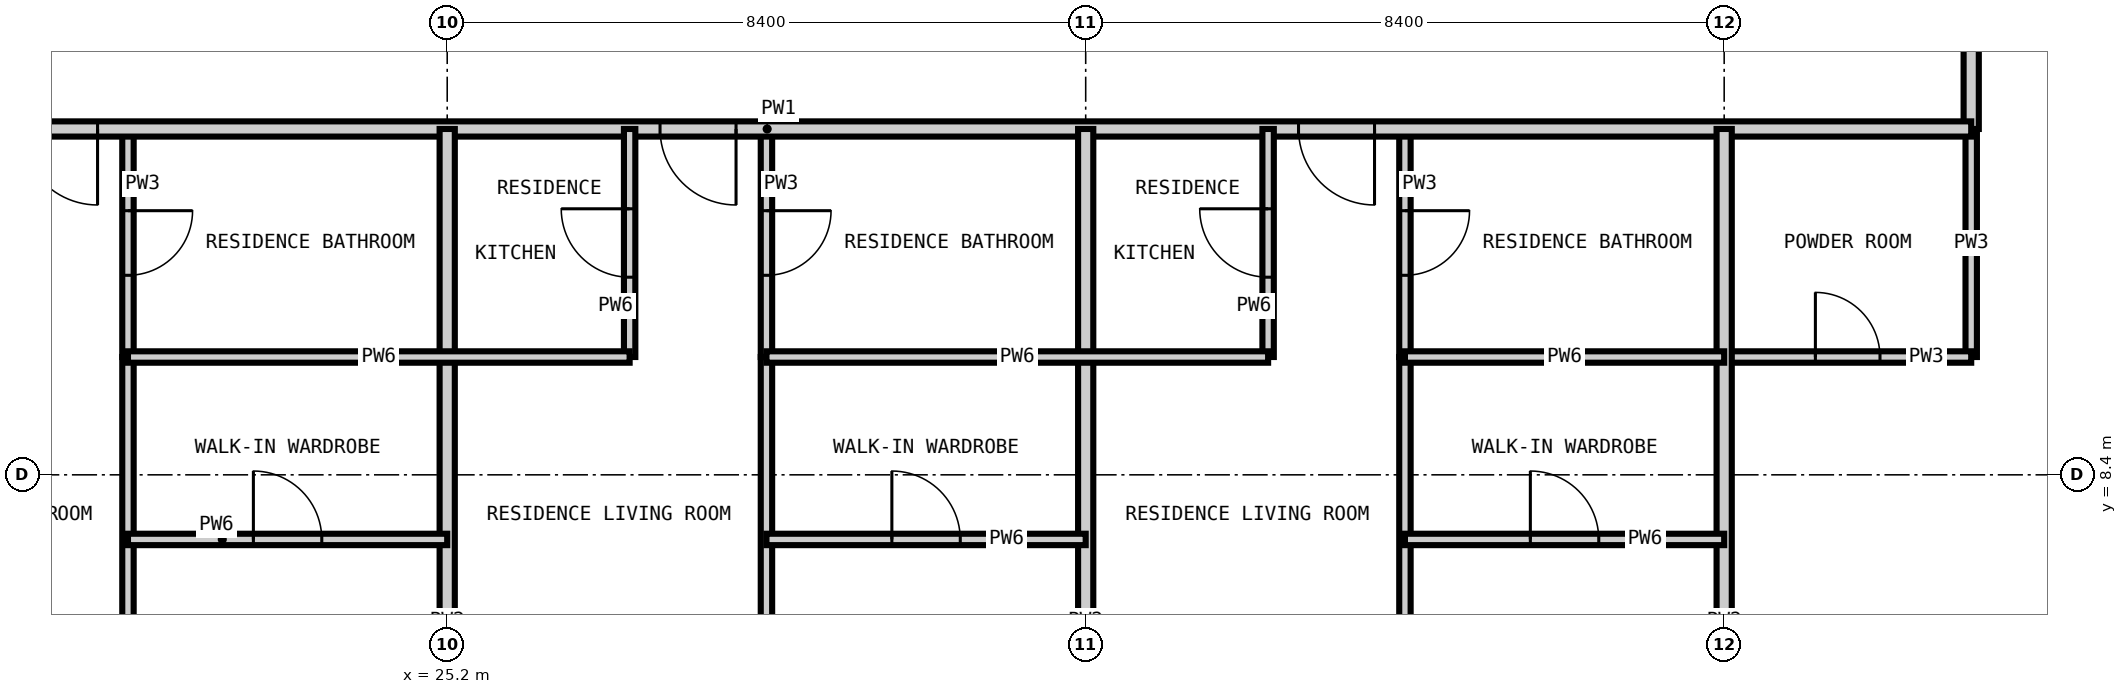
"""IFC4 building model, lengths in metres.
Left out: names, types, materials, properties, quantities, classifications, styles, units other than length and angle.
Written with IfcOpenShell. Run it as: python <this file> out.ifc"""

import sys

from ifc_helpers import new_model, si_unit, direction, frame, frame_2d, origin, place, context, subcontext, project, spatial, rectangle, extrude, element, fill, save


model = new_model("IFC4")
c1 = context("Model", 3, precision=1e-05, world=origin(), true_north=direction((0.0, 1.0)))
c2 = subcontext(c1, "Body", "Model", "MODEL_VIEW")
j1 = project(units=[si_unit("LENGTHUNIT", "METRE"), si_unit("PLANEANGLEUNIT", "RADIAN")], contexts=[c1])
p1 = place(None, origin())
s1 = spatial("IfcSite", under=j1, at=p1, CompositionType="ELEMENT")
p2 = place(p1, origin())
s2 = spatial("IfcBuilding", under=s1, at=p2, CompositionType="ELEMENT")
p3 = place(p2, frame((0.0, 0.0, 45.0)))
s3 = spatial("IfcBuildingStorey", under=s2, at=p3, CompositionType="ELEMENT", Elevation=45.0)
p4 = place(p3, frame((21.0, 9.95, 0.0), z_axis=(0.0, 0.0, 1.0), x_axis=(0.0, 1.0, 0.0)))
e1 = element("IfcWall", 1, at=p4, inside=s3, PredefinedType="PARTITIONING", context=c2, shape_type="SweptSolid", body=[
    extrude(rectangle(XDim=3.0, YDim=0.15, at=frame_2d((1.5, 0.0))), origin(), (0.0, 0.0, 1.0), 3.25),
])
p5 = place(p4, frame((1.075, 0.0, 0.0)))
e2 = element("IfcOpeningElement", 2, at=p5, cuts=e1, PredefinedType="OPENING", context=c2, shape_type="SweptSolid", body=[
    extrude(rectangle(XDim=0.85, YDim=2.1, at=frame_2d((0.425, 1.05))), frame((0.0, 0.085, 0.0), z_axis=(0.0, -1.0, 0.0), x_axis=(1.0, 0.0, 0.0)), (0.0, 0.0, 1.0), 0.17),
])
p6 = place(p3, frame((29.4, 9.95, 0.0), z_axis=(0.0, 0.0, 1.0), x_axis=(0.0, 1.0, 0.0)))
e3 = element("IfcWall", 3, at=p6, inside=s3, PredefinedType="PARTITIONING", context=c2, shape_type="SweptSolid", body=[
    extrude(rectangle(XDim=3.0, YDim=0.15, at=frame_2d((1.5, 0.0))), origin(), (0.0, 0.0, 1.0), 3.25),
])
p7 = place(p6, frame((1.075, 0.0, 0.0)))
e4 = element("IfcOpeningElement", 4, at=p7, cuts=e3, PredefinedType="OPENING", context=c2, shape_type="SweptSolid", body=[
    extrude(rectangle(XDim=0.85, YDim=2.1, at=frame_2d((0.425, 1.05))), frame((0.0, 0.085, 0.0), z_axis=(0.0, -1.0, 0.0), x_axis=(1.0, 0.0, 0.0)), (0.0, 0.0, 1.0), 0.17),
])
p8 = place(p3, frame((37.8, 9.95, 0.0), z_axis=(0.0, 0.0, 1.0), x_axis=(0.0, 1.0, 0.0)))
e5 = element("IfcWall", 5, at=p8, inside=s3, PredefinedType="PARTITIONING", context=c2, shape_type="SweptSolid", body=[
    extrude(rectangle(XDim=3.0, YDim=0.15, at=frame_2d((1.5, 0.0))), origin(), (0.0, 0.0, 1.0), 3.25),
])
p9 = place(p8, frame((1.075, 0.0, 0.0)))
e6 = element("IfcOpeningElement", 6, at=p9, cuts=e5, PredefinedType="OPENING", context=c2, shape_type="SweptSolid", body=[
    extrude(rectangle(XDim=0.85, YDim=2.1, at=frame_2d((0.425, 1.05))), frame((0.0, 0.085, 0.0), z_axis=(0.0, -1.0, 0.0), x_axis=(1.0, 0.0, 0.0)), (0.0, 0.0, 1.0), 0.17),
])
p10 = place(p3, frame((45.25, 9.95, 0.0), z_axis=(0.0, 0.0, 1.0), x_axis=(0.0, 1.0, 0.0)))
e7 = element("IfcWall", 7, at=p10, inside=s3, PredefinedType="PARTITIONING", context=c2, shape_type="SweptSolid", body=[
    extrude(rectangle(XDim=3.0, YDim=0.15, at=frame_2d((1.5, 0.0))), origin(), (0.0, 0.0, 1.0), 3.25),
])
p11 = place(p3, frame((42.0, 9.95, 0.0), z_axis=(0.0, 0.0, 1.0), x_axis=(1.0, 0.0, 0.0)))
e8 = element("IfcWall", 8, at=p11, inside=s3, PredefinedType="PARTITIONING", context=c2, shape_type="SweptSolid", body=[
    extrude(rectangle(XDim=3.25, YDim=0.15, at=frame_2d((1.625, 0.0))), origin(), (0.0, 0.0, 1.0), 3.25),
])
p12 = place(p11, frame((1.2, 0.0, 0.0)))
e9 = element("IfcOpeningElement", 9, at=p12, cuts=e8, PredefinedType="OPENING", context=c2, shape_type="SweptSolid", body=[
    extrude(rectangle(XDim=0.85, YDim=2.1, at=frame_2d((0.425, 1.05))), frame((0.0, 0.085, 0.0), z_axis=(0.0, -1.0, 0.0), x_axis=(1.0, 0.0, 0.0)), (0.0, 0.0, 1.0), 0.17),
])
p13 = place(p3, frame((45.25, 45.55, 0.0), z_axis=(0.0, 0.0, 1.0), x_axis=(0.0, -1.0, 0.0)))
e10 = element("IfcWall", 10, at=p13, inside=s3, PredefinedType="PARTITIONING", context=c2, shape_type="SweptSolid", body=[
    extrude(rectangle(XDim=32.6, YDim=0.2, at=frame_2d((16.3, 0.0))), origin(), (0.0, 0.0, 1.0), 3.25),
])
p14 = place(p13, frame((24.8, 0.0, 0.0)))
e11 = element("IfcOpeningElement", 11, at=p14, cuts=e10, PredefinedType="OPENING", context=c2, shape_type="SweptSolid", body=[
    extrude(rectangle(XDim=1.0, YDim=2.2, at=frame_2d((0.5, 1.1))), frame((0.0, 0.11, 0.0), z_axis=(0.0, -1.0, 0.0), x_axis=(1.0, 0.0, 0.0)), (0.0, 0.0, 1.0), 0.22),
])
p15 = place(p13, frame((19.85, 0.0, 0.0)))
e12 = element("IfcOpeningElement", 12, at=p15, cuts=e10, PredefinedType="OPENING", context=c2, shape_type="SweptSolid", body=[
    extrude(rectangle(XDim=1.0, YDim=2.2, at=frame_2d((0.5, 1.1))), frame((0.0, 0.11, 0.0), z_axis=(0.0, -1.0, 0.0), x_axis=(1.0, 0.0, 0.0)), (0.0, 0.0, 1.0), 0.22),
])
p16 = place(p13, frame((11.45, 0.0, 0.0)))
e13 = element("IfcOpeningElement", 13, at=p16, cuts=e10, PredefinedType="OPENING", context=c2, shape_type="SweptSolid", body=[
    extrude(rectangle(XDim=1.0, YDim=2.2, at=frame_2d((0.5, 1.1))), frame((0.0, 0.11, 0.0), z_axis=(0.0, -1.0, 0.0), x_axis=(1.0, 0.0, 0.0)), (0.0, 0.0, 1.0), 0.22),
])
p17 = place(p13, frame((6.5, 0.0, 0.0)))
e14 = element("IfcOpeningElement", 14, at=p17, cuts=e10, PredefinedType="OPENING", context=c2, shape_type="SweptSolid", body=[
    extrude(rectangle(XDim=1.0, YDim=2.2, at=frame_2d((0.5, 1.1))), frame((0.0, 0.11, 0.0), z_axis=(0.0, -1.0, 0.0), x_axis=(1.0, 0.0, 0.0)), (0.0, 0.0, 1.0), 0.22),
])
p18 = place(p13, frame((30.175, 0.0, 0.0)))
e15 = element("IfcOpeningElement", 15, at=p18, cuts=e10, PredefinedType="OPENING", context=c2, shape_type="SweptSolid", body=[
    extrude(rectangle(XDim=1.0, YDim=2.2, at=frame_2d((0.5, 1.1))), frame((0.0, 0.11, 0.0), z_axis=(0.0, -1.0, 0.0), x_axis=(1.0, 0.0, 0.0)), (0.0, 0.0, 1.0), 0.22),
])
p19 = place(p13, frame((1.275, 0.0, 0.0)))
e16 = element("IfcOpeningElement", 16, at=p19, cuts=e10, PredefinedType="OPENING", context=c2, shape_type="SweptSolid", body=[
    extrude(rectangle(XDim=1.0, YDim=2.2, at=frame_2d((0.5, 1.1))), frame((0.0, 0.11, 0.0), z_axis=(0.0, -1.0, 0.0), x_axis=(1.0, 0.0, 0.0)), (0.0, 0.0, 1.0), 0.22),
])
p20 = place(p3, frame((45.25, 12.95, 0.0), z_axis=(0.0, 0.0, 1.0), x_axis=(-1.0, 0.0, 0.0)))
e17 = element("IfcWall", 17, at=p20, inside=s3, PredefinedType="PARTITIONING", context=c2, shape_type="SweptSolid", body=[
    extrude(rectangle(XDim=32.3, YDim=0.2, at=frame_2d((16.15, 0.0))), origin(), (0.0, 0.0, 1.0), 3.25),
])
p21 = place(p20, frame((24.65, 0.0, 0.0)))
e18 = element("IfcOpeningElement", 18, at=p21, cuts=e17, PredefinedType="OPENING", context=c2, shape_type="SweptSolid", body=[
    extrude(rectangle(XDim=1.0, YDim=2.2, at=frame_2d((0.5, 1.1))), frame((0.0, 0.11, 0.0), z_axis=(0.0, -1.0, 0.0), x_axis=(1.0, 0.0, 0.0)), (0.0, 0.0, 1.0), 0.22),
])
p22 = place(p20, frame((16.25, 0.0, 0.0)))
e19 = element("IfcOpeningElement", 19, at=p22, cuts=e17, PredefinedType="OPENING", context=c2, shape_type="SweptSolid", body=[
    extrude(rectangle(XDim=1.0, YDim=2.2, at=frame_2d((0.5, 1.1))), frame((0.0, 0.11, 0.0), z_axis=(0.0, -1.0, 0.0), x_axis=(1.0, 0.0, 0.0)), (0.0, 0.0, 1.0), 0.22),
])
p23 = place(p20, frame((7.85, 0.0, 0.0)))
e20 = element("IfcOpeningElement", 20, at=p23, cuts=e17, PredefinedType="OPENING", context=c2, shape_type="SweptSolid", body=[
    extrude(rectangle(XDim=1.0, YDim=2.2, at=frame_2d((0.5, 1.1))), frame((0.0, 0.11, 0.0), z_axis=(0.0, -1.0, 0.0), x_axis=(1.0, 0.0, 0.0)), (0.0, 0.0, 1.0), 0.22),
])
for number, where, z_axis, x_axis in (
    (21, (25.2, -0.008, 0.0), (0.0, 0.0, 1.0), (0.0, 1.0, 0.0)),
    (22, (33.6, -0.008, 0.0), (0.0, 0.0, 1.0), (0.0, 1.0, 0.0)),
    (23, (42.0, -0.008, 0.0), (0.0, 0.0, 1.0), (0.0, 1.0, 0.0)),
):
    element("IfcWall", number, at=place(p3, frame(where, z_axis=z_axis, x_axis=x_axis)), inside=s3, PredefinedType="PARTITIONING", context=c2, shape_type="SweptSolid", body=[
        extrude(rectangle(XDim=12.958, YDim=0.2, at=frame_2d((6.479, 0.0))), origin(), (0.0, 0.0, 1.0), 3.25),
    ])
p24 = place(p3, frame((21.0, -0.008, 0.0), z_axis=(0.0, 0.0, 1.0), x_axis=(0.0, 1.0, 0.0)))
e24 = element("IfcWall", 24, at=p24, inside=s3, PredefinedType="PARTITIONING", context=c2, shape_type="SweptSolid", body=[
    extrude(rectangle(XDim=9.958, YDim=0.15, at=frame_2d((4.979, 0.0))), origin(), (0.0, 0.0, 1.0), 3.25),
])
p25 = place(p24, frame((3.333, 0.0, 0.0)))
e25 = element("IfcOpeningElement", 25, at=p25, cuts=e24, PredefinedType="OPENING", context=c2, shape_type="SweptSolid", body=[
    extrude(rectangle(XDim=0.9, YDim=2.1, at=frame_2d((0.45, 1.05))), frame((0.0, 0.085, 0.0), z_axis=(0.0, -1.0, 0.0), x_axis=(1.0, 0.0, 0.0)), (0.0, 0.0, 1.0), 0.17),
])
p26 = place(p3, frame((27.6, 9.95, 0.0), z_axis=(0.0, 0.0, 1.0), x_axis=(0.0, 1.0, 0.0)))
e26 = element("IfcWall", 26, at=p26, inside=s3, PredefinedType="PARTITIONING", context=c2, shape_type="SweptSolid", body=[
    extrude(rectangle(XDim=3.0, YDim=0.15, at=frame_2d((1.5, 0.0))), origin(), (0.0, 0.0, 1.0), 3.25),
])
p27 = place(p26, frame((1.05, 0.0, 0.0)))
e27 = element("IfcOpeningElement", 27, at=p27, cuts=e26, PredefinedType="OPENING", context=c2, shape_type="SweptSolid", body=[
    extrude(rectangle(XDim=0.9, YDim=2.1, at=frame_2d((0.45, 1.05))), frame((0.0, 0.085, 0.0), z_axis=(0.0, -1.0, 0.0), x_axis=(1.0, 0.0, 0.0)), (0.0, 0.0, 1.0), 0.17),
])
p28 = place(p3, frame((29.4, -0.008, 0.0), z_axis=(0.0, 0.0, 1.0), x_axis=(0.0, 1.0, 0.0)))
e28 = element("IfcWall", 28, at=p28, inside=s3, PredefinedType="PARTITIONING", context=c2, shape_type="SweptSolid", body=[
    extrude(rectangle(XDim=9.958, YDim=0.15, at=frame_2d((4.979, 0.0))), origin(), (0.0, 0.0, 1.0), 3.25),
])
p29 = place(p28, frame((3.333, 0.0, 0.0)))
e29 = element("IfcOpeningElement", 29, at=p29, cuts=e28, PredefinedType="OPENING", context=c2, shape_type="SweptSolid", body=[
    extrude(rectangle(XDim=0.9, YDim=2.1, at=frame_2d((0.45, 1.05))), frame((0.0, 0.085, 0.0), z_axis=(0.0, -1.0, 0.0), x_axis=(1.0, 0.0, 0.0)), (0.0, 0.0, 1.0), 0.17),
])
p30 = place(p3, frame((36.0, 9.95, 0.0), z_axis=(0.0, 0.0, 1.0), x_axis=(0.0, 1.0, 0.0)))
e30 = element("IfcWall", 30, at=p30, inside=s3, PredefinedType="PARTITIONING", context=c2, shape_type="SweptSolid", body=[
    extrude(rectangle(XDim=3.0, YDim=0.15, at=frame_2d((1.5, 0.0))), origin(), (0.0, 0.0, 1.0), 3.25),
])
p31 = place(p30, frame((1.05, 0.0, 0.0)))
e31 = element("IfcOpeningElement", 31, at=p31, cuts=e30, PredefinedType="OPENING", context=c2, shape_type="SweptSolid", body=[
    extrude(rectangle(XDim=0.9, YDim=2.1, at=frame_2d((0.45, 1.05))), frame((0.0, 0.085, 0.0), z_axis=(0.0, -1.0, 0.0), x_axis=(1.0, 0.0, 0.0)), (0.0, 0.0, 1.0), 0.17),
])
p32 = place(p3, frame((37.8, -0.008, 0.0), z_axis=(0.0, 0.0, 1.0), x_axis=(0.0, 1.0, 0.0)))
e32 = element("IfcWall", 32, at=p32, inside=s3, PredefinedType="PARTITIONING", context=c2, shape_type="SweptSolid", body=[
    extrude(rectangle(XDim=9.958, YDim=0.15, at=frame_2d((4.979, 0.0))), origin(), (0.0, 0.0, 1.0), 3.25),
])
p33 = place(p32, frame((3.333, 0.0, 0.0)))
e33 = element("IfcOpeningElement", 33, at=p33, cuts=e32, PredefinedType="OPENING", context=c2, shape_type="SweptSolid", body=[
    extrude(rectangle(XDim=0.9, YDim=2.1, at=frame_2d((0.45, 1.05))), frame((0.0, 0.085, 0.0), z_axis=(0.0, -1.0, 0.0), x_axis=(1.0, 0.0, 0.0)), (0.0, 0.0, 1.0), 0.17),
])
p34 = place(p3, frame((21.0, 7.55, 0.0), z_axis=(0.0, 0.0, 1.0), x_axis=(1.0, 0.0, 0.0)))
e34 = element("IfcWall", 34, at=p34, inside=s3, PredefinedType="PARTITIONING", context=c2, shape_type="SweptSolid", body=[
    extrude(rectangle(XDim=4.2, YDim=0.15, at=frame_2d((2.1, 0.0))), origin(), (0.0, 0.0, 1.0), 3.25),
])
p35 = place(p34, frame((1.65, 0.0, 0.0)))
e35 = element("IfcOpeningElement", 35, at=p35, cuts=e34, PredefinedType="OPENING", context=c2, shape_type="SweptSolid", body=[
    extrude(rectangle(XDim=0.9, YDim=2.1, at=frame_2d((0.45, 1.05))), frame((0.0, 0.085, 0.0), z_axis=(0.0, -1.0, 0.0), x_axis=(1.0, 0.0, 0.0)), (0.0, 0.0, 1.0), 0.17),
])
p36 = place(p3, frame((29.4, 7.55, 0.0), z_axis=(0.0, 0.0, 1.0), x_axis=(1.0, 0.0, 0.0)))
e36 = element("IfcWall", 36, at=p36, inside=s3, PredefinedType="PARTITIONING", context=c2, shape_type="SweptSolid", body=[
    extrude(rectangle(XDim=4.2, YDim=0.15, at=frame_2d((2.1, 0.0))), origin(), (0.0, 0.0, 1.0), 3.25),
])
p37 = place(p36, frame((1.65, 0.0, 0.0)))
e37 = element("IfcOpeningElement", 37, at=p37, cuts=e36, PredefinedType="OPENING", context=c2, shape_type="SweptSolid", body=[
    extrude(rectangle(XDim=0.9, YDim=2.1, at=frame_2d((0.45, 1.05))), frame((0.0, 0.085, 0.0), z_axis=(0.0, -1.0, 0.0), x_axis=(1.0, 0.0, 0.0)), (0.0, 0.0, 1.0), 0.17),
])
p38 = place(p3, frame((37.8, 7.55, 0.0), z_axis=(0.0, 0.0, 1.0), x_axis=(1.0, 0.0, 0.0)))
e38 = element("IfcWall", 38, at=p38, inside=s3, PredefinedType="PARTITIONING", context=c2, shape_type="SweptSolid", body=[
    extrude(rectangle(XDim=4.2, YDim=0.15, at=frame_2d((2.1, 0.0))), origin(), (0.0, 0.0, 1.0), 3.25),
])
p39 = place(p38, frame((1.65, 0.0, 0.0)))
e39 = element("IfcOpeningElement", 39, at=p39, cuts=e38, PredefinedType="OPENING", context=c2, shape_type="SweptSolid", body=[
    extrude(rectangle(XDim=0.9, YDim=2.1, at=frame_2d((0.45, 1.05))), frame((0.0, 0.085, 0.0), z_axis=(0.0, -1.0, 0.0), x_axis=(1.0, 0.0, 0.0)), (0.0, 0.0, 1.0), 0.17),
])
for number, where, z_axis, x_axis in (
    (40, (21.0, 9.95, 0.0), (0.0, 0.0, 1.0), (1.0, 0.0, 0.0)),
    (41, (29.4, 9.95, 0.0), (0.0, 0.0, 1.0), (1.0, 0.0, 0.0)),
):
    element("IfcWall", number, at=place(p3, frame(where, z_axis=z_axis, x_axis=x_axis)), inside=s3, PredefinedType="PARTITIONING", context=c2, shape_type="SweptSolid", body=[
        extrude(rectangle(XDim=6.6, YDim=0.15, at=frame_2d((3.3, 0.0))), origin(), (0.0, 0.0, 1.0), 3.25),
    ])
p40 = place(p3, frame((37.8, 9.95, 0.0), z_axis=(0.0, 0.0, 1.0), x_axis=(1.0, 0.0, 0.0)))
e42 = element("IfcWall", 42, at=p40, inside=s3, PredefinedType="PARTITIONING", context=c2, shape_type="SweptSolid", body=[
    extrude(rectangle(XDim=4.2, YDim=0.15, at=frame_2d((2.1, 0.0))), origin(), (0.0, 0.0, 1.0), 3.25),
])
p41 = place(p21, origin())
e43 = element("IfcDoor", 43, at=p41, inside=s3, OperationType="SINGLE_SWING_LEFT", PredefinedType="DOOR", context=c2, shape_type="SweptSolid", body=[
    extrude(rectangle(XDim=1.0, YDim=2.2, at=frame_2d((0.5, 1.1))), frame((0.0, 0.025, 0.0), z_axis=(0.0, -1.0, 0.0), x_axis=(1.0, 0.0, 0.0)), (0.0, 0.0, 1.0), 0.05),
])
fill(e18, e43)
p42 = place(p5, frame((0.85, 0.0, 0.0), z_axis=(0.0, 0.0, 1.0), x_axis=(-1.0, 0.0, 0.0)))
e44 = element("IfcDoor", 44, at=p42, inside=s3, OperationType="SINGLE_SWING_LEFT", PredefinedType="DOOR", context=c2, shape_type="SweptSolid", body=[
    extrude(rectangle(XDim=0.85, YDim=2.1, at=frame_2d((0.425, 1.05))), frame((0.0, 0.025, 0.0), z_axis=(0.0, -1.0, 0.0), x_axis=(1.0, 0.0, 0.0)), (0.0, 0.0, 1.0), 0.05),
])
fill(e2, e44)
p43 = place(p35, origin())
e45 = element("IfcDoor", 45, at=p43, inside=s3, OperationType="SINGLE_SWING_LEFT", PredefinedType="DOOR", context=c2, shape_type="SweptSolid", body=[
    extrude(rectangle(XDim=0.9, YDim=2.1, at=frame_2d((0.45, 1.05))), frame((0.0, 0.025, 0.0), z_axis=(0.0, -1.0, 0.0), x_axis=(1.0, 0.0, 0.0)), (0.0, 0.0, 1.0), 0.05),
])
fill(e35, e45)
p44 = place(p22, origin())
e46 = element("IfcDoor", 46, at=p44, inside=s3, OperationType="SINGLE_SWING_LEFT", PredefinedType="DOOR", context=c2, shape_type="SweptSolid", body=[
    extrude(rectangle(XDim=1.0, YDim=2.2, at=frame_2d((0.5, 1.1))), frame((0.0, 0.025, 0.0), z_axis=(0.0, -1.0, 0.0), x_axis=(1.0, 0.0, 0.0)), (0.0, 0.0, 1.0), 0.05),
])
fill(e19, e46)
p45 = place(p27, origin())
e47 = element("IfcDoor", 47, at=p45, inside=s3, OperationType="SINGLE_SWING_RIGHT", PredefinedType="DOOR", context=c2, shape_type="SweptSolid", body=[
    extrude(rectangle(XDim=0.9, YDim=2.1, at=frame_2d((0.45, 1.05))), frame((0.0, 0.025, 0.0), z_axis=(0.0, -1.0, 0.0), x_axis=(1.0, 0.0, 0.0)), (0.0, 0.0, 1.0), 0.05),
])
fill(e27, e47)
p46 = place(p7, frame((0.85, 0.0, 0.0), z_axis=(0.0, 0.0, 1.0), x_axis=(-1.0, 0.0, 0.0)))
e48 = element("IfcDoor", 48, at=p46, inside=s3, OperationType="SINGLE_SWING_LEFT", PredefinedType="DOOR", context=c2, shape_type="SweptSolid", body=[
    extrude(rectangle(XDim=0.85, YDim=2.1, at=frame_2d((0.425, 1.05))), frame((0.0, 0.025, 0.0), z_axis=(0.0, -1.0, 0.0), x_axis=(1.0, 0.0, 0.0)), (0.0, 0.0, 1.0), 0.05),
])
fill(e4, e48)
p47 = place(p37, origin())
e49 = element("IfcDoor", 49, at=p47, inside=s3, OperationType="SINGLE_SWING_LEFT", PredefinedType="DOOR", context=c2, shape_type="SweptSolid", body=[
    extrude(rectangle(XDim=0.9, YDim=2.1, at=frame_2d((0.45, 1.05))), frame((0.0, 0.025, 0.0), z_axis=(0.0, -1.0, 0.0), x_axis=(1.0, 0.0, 0.0)), (0.0, 0.0, 1.0), 0.05),
])
fill(e37, e49)
p48 = place(p23, origin())
e50 = element("IfcDoor", 50, at=p48, inside=s3, OperationType="SINGLE_SWING_LEFT", PredefinedType="DOOR", context=c2, shape_type="SweptSolid", body=[
    extrude(rectangle(XDim=1.0, YDim=2.2, at=frame_2d((0.5, 1.1))), frame((0.0, 0.025, 0.0), z_axis=(0.0, -1.0, 0.0), x_axis=(1.0, 0.0, 0.0)), (0.0, 0.0, 1.0), 0.05),
])
fill(e20, e50)
p49 = place(p31, origin())
e51 = element("IfcDoor", 51, at=p49, inside=s3, OperationType="SINGLE_SWING_RIGHT", PredefinedType="DOOR", context=c2, shape_type="SweptSolid", body=[
    extrude(rectangle(XDim=0.9, YDim=2.1, at=frame_2d((0.45, 1.05))), frame((0.0, 0.025, 0.0), z_axis=(0.0, -1.0, 0.0), x_axis=(1.0, 0.0, 0.0)), (0.0, 0.0, 1.0), 0.05),
])
fill(e31, e51)
p50 = place(p9, frame((0.85, 0.0, 0.0), z_axis=(0.0, 0.0, 1.0), x_axis=(-1.0, 0.0, 0.0)))
e52 = element("IfcDoor", 52, at=p50, inside=s3, OperationType="SINGLE_SWING_LEFT", PredefinedType="DOOR", context=c2, shape_type="SweptSolid", body=[
    extrude(rectangle(XDim=0.85, YDim=2.1, at=frame_2d((0.425, 1.05))), frame((0.0, 0.025, 0.0), z_axis=(0.0, -1.0, 0.0), x_axis=(1.0, 0.0, 0.0)), (0.0, 0.0, 1.0), 0.05),
])
fill(e6, e52)
p51 = place(p39, origin())
e53 = element("IfcDoor", 53, at=p51, inside=s3, OperationType="SINGLE_SWING_LEFT", PredefinedType="DOOR", context=c2, shape_type="SweptSolid", body=[
    extrude(rectangle(XDim=0.9, YDim=2.1, at=frame_2d((0.45, 1.05))), frame((0.0, 0.025, 0.0), z_axis=(0.0, -1.0, 0.0), x_axis=(1.0, 0.0, 0.0)), (0.0, 0.0, 1.0), 0.05),
])
fill(e39, e53)
p52 = place(p12, origin())
e54 = element("IfcDoor", 54, at=p52, inside=s3, OperationType="SINGLE_SWING_LEFT", PredefinedType="DOOR", context=c2, shape_type="SweptSolid", body=[
    extrude(rectangle(XDim=0.85, YDim=2.1, at=frame_2d((0.425, 1.05))), frame((0.0, 0.025, 0.0), z_axis=(0.0, -1.0, 0.0), x_axis=(1.0, 0.0, 0.0)), (0.0, 0.0, 1.0), 0.05),
])
fill(e9, e54)
save(model, sys.argv[1])
